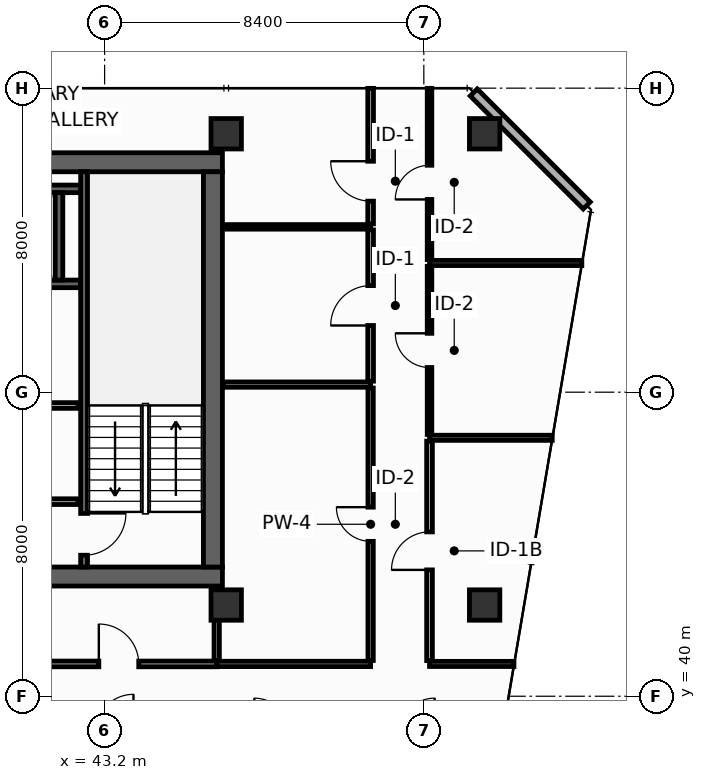
"""IFC4 building model, lengths in metres.
Left out: names, types, materials, properties, quantities, classifications, styles, units other than length and angle.
Written with IfcOpenShell. Run it as: python <this file> out.ifc"""

import sys

from ifc_helpers import new_model, si_unit, direction, frame, frame_2d, origin, origin_2d, place, context, subcontext, project, spatial, rectangle, hollow_rectangle, extrude, element, fill, save


model = new_model("IFC4")
c1 = context("Model", 3, precision=1e-05, world=origin(), true_north=direction((0.0, 1.0)))
c2 = subcontext(c1, "Body", "Model", "MODEL_VIEW")
j1 = project(units=[si_unit("LENGTHUNIT", "METRE"), si_unit("PLANEANGLEUNIT", "RADIAN")], contexts=[c1])
p1 = place(None, origin())
s1 = spatial("IfcSite", under=j1, at=p1, CompositionType="ELEMENT")
p2 = place(p1, origin())
s2 = spatial("IfcBuilding", under=s1, at=p2, CompositionType="ELEMENT")
p3 = place(p2, frame((0.0, 0.0, 205.6)))
s3 = spatial("IfcBuildingStorey", under=s2, at=p3, CompositionType="ELEMENT", Elevation=205.6)
p4 = place(p3, frame((13.6, 43.15, 0.0), z_axis=(0.0, 0.0, 1.0), x_axis=(1.0, 0.0, 0.0)))
e1 = element("IfcWall", 1, at=p4, inside=s3, PredefinedType="SHEAR", context=c2, shape_type="SweptSolid", body=[
    extrude(rectangle(XDim=32.7, YDim=0.5, at=frame_2d((16.35, 0.0))), origin(), (0.0, 0.0, 1.0), 3.55),
])
p5 = place(p4, frame((5.4, 0.0, 0.0)))
e2 = element("IfcOpeningElement", 2, at=p5, cuts=e1, PredefinedType="OPENING", context=c2, shape_type="SweptSolid", body=[
    extrude(rectangle(XDim=1.1, YDim=2.15, at=frame_2d((0.55, 1.075))), frame((0.0, 0.26, 0.0), z_axis=(0.0, -1.0, 0.0), x_axis=(1.0, 0.0, 0.0)), (0.0, 0.0, 1.0), 0.52),
])
p6 = place(p4, frame((25.6, 0.0, 0.0)))
e3 = element("IfcOpeningElement", 3, at=p6, cuts=e1, PredefinedType="OPENING", context=c2, shape_type="SweptSolid", body=[
    extrude(rectangle(XDim=1.1, YDim=2.15, at=frame_2d((0.55, 1.075))), frame((0.0, 0.26, 0.0), z_axis=(0.0, -1.0, 0.0), x_axis=(1.0, 0.0, 0.0)), (0.0, 0.0, 1.0), 0.52),
])
p7 = place(p3, frame((13.6, 54.05, 0.0), z_axis=(0.0, 0.0, 1.0), x_axis=(1.0, 0.0, 0.0)))
e4 = element("IfcWall", 4, at=p7, inside=s3, PredefinedType="SHEAR", context=c2, shape_type="SweptSolid", body=[
    extrude(rectangle(XDim=32.7, YDim=0.5, at=frame_2d((16.35, 0.0))), origin(), (0.0, 0.0, 1.0), 3.55),
])
p8 = place(p3, frame((46.05, 43.4, 0.0), z_axis=(0.0, 0.0, 1.0), x_axis=(0.0, 1.0, 0.0)))
e5 = element("IfcWall", 5, at=p8, inside=s3, PredefinedType="SHEAR", context=c2, shape_type="SweptSolid", body=[
    extrude(rectangle(XDim=10.4, YDim=0.5, at=frame_2d((5.2, 0.0))), origin(), (0.0, 0.0, 1.0), 3.55),
])
for number, where, z_axis, x_axis in (
    (6, (46.4, 54.8, 0.0), (0.0, 0.0, 1.0), (1.0, 0.0, 0.0)),
    (7, (53.2, 54.8, 0.0), (0.0, 0.0, 1.0), (1.0, 0.0, 0.0)),
    (8, (46.4, 42.4, 0.0), (0.0, 0.0, 1.0), (1.0, 0.0, 0.0)),
    (9, (53.2, 42.4, 0.0), (0.0, 0.0, 1.0), (1.0, 0.0, 0.0)),
):
    element("IfcColumn", number, at=place(p3, frame(where, z_axis=z_axis, x_axis=x_axis)), inside=s3, PredefinedType="COLUMN", context=c2, shape_type="SweptSolid", body=[
        extrude(hollow_rectangle(XDim=0.8, YDim=0.8, WallThickness=0.036, at=origin_2d()), origin(), (0.0, 0.0, 1.0), 3.8),
    ])
for number, where, z_axis, x_axis in (
    (10, (39.525, 50.85, 0.0), (0.0, 0.0, 1.0), (1.0, 0.0, 0.0)),
    (11, (39.525, 53.35, 0.0), (0.0, 0.0, 1.0), (1.0, 0.0, 0.0)),
):
    element("IfcWall", number, at=place(p3, frame(where, z_axis=z_axis, x_axis=x_axis)), inside=s3, PredefinedType="SHEAR", context=c2, shape_type="SweptSolid", body=[
        extrude(rectangle(XDim=3.045, YDim=0.2, at=frame_2d((1.522, 0.0))), origin(), (0.0, 0.0, 1.0), 3.55),
    ])
p9 = place(p3, frame((42.0, 50.95, 0.0), z_axis=(0.0, 0.0, 1.0), x_axis=(0.0, 1.0, 0.0)))
e12 = element("IfcWall", 12, at=p9, inside=s3, PredefinedType="SHEAR", context=c2, shape_type="SweptSolid", body=[
    extrude(rectangle(XDim=2.3, YDim=0.2, at=frame_2d((1.15, 0.0))), origin(), (0.0, 0.0, 1.0), 3.55),
])
p10 = place(p3, frame((42.66, 53.8, 0.0), z_axis=(0.0, 0.0, 1.0), x_axis=(0.0, -1.0, 0.0)))
e13 = element("IfcWall", 13, at=p10, inside=s3, PredefinedType="SHEAR", context=c2, shape_type="SweptSolid", body=[
    extrude(rectangle(XDim=10.4, YDim=0.18, at=frame_2d((5.2, 0.0))), origin(), (0.0, 0.0, 1.0), 3.55),
])
p11 = place(p10, frame((8.99, 0.0, 0.0)))
e14 = element("IfcOpeningElement", 14, at=p11, cuts=e13, PredefinedType="OPENING", context=c2, shape_type="SweptSolid", body=[
    extrude(rectangle(XDim=1.1, YDim=2.15, at=frame_2d((0.55, 1.075))), frame((0.0, 0.1, 0.0), z_axis=(0.0, -1.0, 0.0), x_axis=(1.0, 0.0, 0.0)), (0.0, 0.0, 1.0), 0.2),
])
p12 = place(p3, frame((33.95, 45.12, 0.0), z_axis=(0.0, 0.0, 1.0), x_axis=(1.0, 0.0, 0.0)))
e15 = element("IfcWall", 15, at=p12, inside=s3, PredefinedType="PARTITIONING", context=c2, shape_type="SweptSolid", body=[
    extrude(rectangle(XDim=8.55, YDim=0.15, at=frame_2d((4.275, 0.0))), origin(), (0.0, 0.0, 1.0), 3.55),
])
p13 = place(p12, frame((0.95, 0.0, 0.0)))
e16 = element("IfcOpeningElement", 16, at=p13, cuts=e15, PredefinedType="OPENING", context=c2, shape_type="SweptSolid", body=[
    extrude(rectangle(XDim=0.95, YDim=2.15, at=frame_2d((0.475, 1.075))), frame((0.0, 0.085, 0.0), z_axis=(0.0, -1.0, 0.0), x_axis=(1.0, 0.0, 0.0)), (0.0, 0.0, 1.0), 0.17),
])
p14 = place(p12, frame((3.8, 0.0, 0.0)))
e17 = element("IfcOpeningElement", 17, at=p14, cuts=e15, PredefinedType="OPENING", context=c2, shape_type="SweptSolid", body=[
    extrude(rectangle(XDim=0.95, YDim=2.15, at=frame_2d((0.475, 1.075))), frame((0.0, 0.085, 0.0), z_axis=(0.0, -1.0, 0.0), x_axis=(1.0, 0.0, 0.0)), (0.0, 0.0, 1.0), 0.17),
])
p15 = place(p12, frame((6.65, 0.0, 0.0)))
e18 = element("IfcOpeningElement", 18, at=p15, cuts=e15, PredefinedType="OPENING", context=c2, shape_type="SweptSolid", body=[
    extrude(rectangle(XDim=0.95, YDim=2.15, at=frame_2d((0.475, 1.075))), frame((0.0, 0.085, 0.0), z_axis=(0.0, -1.0, 0.0), x_axis=(1.0, 0.0, 0.0)), (0.0, 0.0, 1.0), 0.17),
])
p16 = place(p3, frame((33.95, 47.65, 0.0), z_axis=(0.0, 0.0, 1.0), x_axis=(1.0, 0.0, 0.0)))
e19 = element("IfcWall", 19, at=p16, inside=s3, PredefinedType="PARTITIONING", context=c2, shape_type="SweptSolid", body=[
    extrude(rectangle(XDim=8.55, YDim=0.15, at=frame_2d((4.275, 0.0))), origin(), (0.0, 0.0, 1.0), 3.55),
])
p17 = place(p3, frame((55.887, 52.913, 0.0), z_axis=(0.0, 0.0, 1.0), x_axis=(-0.707106781187, 0.707106781187, 0.0)))
e20 = element("IfcWall", 20, at=p17, inside=s3, PredefinedType="STANDARD", context=c2, shape_type="SweptSolid", body=[
    extrude(rectangle(XDim=4.206, YDim=0.26, at=frame_2d((2.103, 0.0))), origin(), (0.0, 0.0, 1.0), 3.55),
])
p18 = place(p3, frame((46.15, 40.85, 0.0), z_axis=(0.0, 0.0, 1.0), x_axis=(1.0, 0.0, 0.0)))
e21 = element("IfcWall", 21, at=p18, inside=s3, PredefinedType="PARTITIONING", context=c2, shape_type="SweptSolid", body=[
    extrude(rectangle(XDim=4.05, YDim=0.14, at=frame_2d((2.025, 0.0))), origin(), (0.0, 0.0, 1.0), 3.55),
])
p19 = place(p3, frame((46.15, 40.94, 0.0), z_axis=(0.0, 0.0, 1.0), x_axis=(0.0, 1.0, 0.0)))
e22 = element("IfcWall", 22, at=p19, inside=s3, PredefinedType="PARTITIONING", context=c2, shape_type="SweptSolid", body=[
    extrude(rectangle(XDim=1.94, YDim=0.14, at=frame_2d((0.97, 0.0))), origin(), (0.0, 0.0, 1.0), 3.55),
])
p20 = place(p3, frame((46.32, 48.2, 0.0), z_axis=(0.0, 0.0, 1.0), x_axis=(1.0, 0.0, 0.0)))
e23 = element("IfcWall", 23, at=p20, inside=s3, PredefinedType="PARTITIONING", context=c2, shape_type="SweptSolid", body=[
    extrude(rectangle(XDim=3.88, YDim=0.14, at=frame_2d((1.94, 0.0))), origin(), (0.0, 0.0, 1.0), 3.55),
])
p21 = place(p3, frame((50.2, 40.94, 0.0), z_axis=(0.0, 0.0, 1.0), x_axis=(0.0, 1.0, 0.0)))
e24 = element("IfcWall", 24, at=p21, inside=s3, PredefinedType="PARTITIONING", context=c2, shape_type="SweptSolid", body=[
    extrude(rectangle(XDim=7.17, YDim=0.14, at=frame_2d((3.585, 0.0))), origin(), (0.0, 0.0, 1.0), 2.835),
])
p22 = place(p21, frame((3.135, 0.0, 0.0)))
e25 = element("IfcOpeningElement", 25, at=p22, cuts=e24, PredefinedType="OPENING", context=c2, shape_type="SweptSolid", body=[
    extrude(rectangle(XDim=0.9, YDim=2.1, at=frame_2d((0.45, 1.05))), frame((0.0, 0.08, 0.0), z_axis=(0.0, -1.0, 0.0), x_axis=(1.0, 0.0, 0.0)), (0.0, 0.0, 1.0), 0.16),
])
p23 = place(p3, frame((46.32, 52.35, 0.0), z_axis=(0.0, 0.0, 1.0), x_axis=(1.0, 0.0, 0.0)))
e26 = element("IfcWall", 26, at=p23, inside=s3, PredefinedType="PARTITIONING", context=c2, shape_type="SweptSolid", body=[
    extrude(rectangle(XDim=3.88, YDim=0.12, at=frame_2d((1.94, 0.0))), origin(), (0.0, 0.0, 1.0), 3.55),
])
p24 = place(p3, frame((50.2, 48.29, 0.0), z_axis=(0.0, 0.0, 1.0), x_axis=(0.0, 1.0, 0.0)))
e27 = element("IfcWall", 27, at=p24, inside=s3, PredefinedType="PARTITIONING", context=c2, shape_type="SweptSolid", body=[
    extrude(rectangle(XDim=3.98, YDim=0.15, at=frame_2d((1.99, 0.0))), origin(), (0.0, 0.0, 1.0), 3.55),
])
p25 = place(p24, frame((1.465, 0.0, 0.0)))
e28 = element("IfcOpeningElement", 28, at=p25, cuts=e27, PredefinedType="OPENING", context=c2, shape_type="SweptSolid", body=[
    extrude(rectangle(XDim=1.05, YDim=2.15, at=frame_2d((0.525, 1.075))), frame((0.0, 0.085, 0.0), z_axis=(0.0, -1.0, 0.0), x_axis=(1.0, 0.0, 0.0)), (0.0, 0.0, 1.0), 0.17),
])
p26 = place(p3, frame((50.2, 52.43, 0.0), z_axis=(0.0, 0.0, 1.0), x_axis=(0.0, 1.0, 0.0)))
e29 = element("IfcWall", 29, at=p26, inside=s3, PredefinedType="PARTITIONING", context=c2, shape_type="SweptSolid", body=[
    extrude(rectangle(XDim=3.565, YDim=0.15, at=frame_2d((1.783, 0.0))), origin(), (0.0, 0.0, 1.0), 2.935),
])
p27 = place(p26, frame((0.597, 0.0, 0.0)))
e30 = element("IfcOpeningElement", 30, at=p27, cuts=e29, PredefinedType="OPENING", context=c2, shape_type="SweptSolid", body=[
    extrude(rectangle(XDim=1.05, YDim=2.15, at=frame_2d((0.525, 1.075))), frame((0.0, 0.085, 0.0), z_axis=(0.0, -1.0, 0.0), x_axis=(1.0, 0.0, 0.0)), (0.0, 0.0, 1.0), 0.17),
])
p28 = place(p3, frame((51.75, 40.85, 0.0), z_axis=(0.0, 0.0, 1.0), x_axis=(1.0, 0.0, 0.0)))
e31 = element("IfcWall", 31, at=p28, inside=s3, PredefinedType="PARTITIONING", context=c2, shape_type="SweptSolid", body=[
    extrude(rectangle(XDim=2.222, YDim=0.135, at=frame_2d((1.111, 0.0))), origin(), (0.0, 0.0, 1.0), 3.035),
])
p29 = place(p3, frame((51.75, 46.8, 0.0), z_axis=(0.0, 0.0, 1.0), x_axis=(1.0, 0.0, 0.0)))
e32 = element("IfcWall", 32, at=p29, inside=s3, PredefinedType="PARTITIONING", context=c2, shape_type="SweptSolid", body=[
    extrude(rectangle(XDim=3.229, YDim=0.135, at=frame_2d((1.615, 0.0))), origin(), (0.0, 0.0, 1.0), 2.835),
])
p30 = place(p3, frame((51.75, 51.4, 0.0), z_axis=(0.0, 0.0, 1.0), x_axis=(1.0, 0.0, 0.0)))
e33 = element("IfcWall", 33, at=p30, inside=s3, PredefinedType="PARTITIONING", context=c2, shape_type="SweptSolid", body=[
    extrude(rectangle(XDim=4.008, YDim=0.135, at=frame_2d((2.004, 0.0))), origin(), (0.0, 0.0, 1.0), 2.835),
])
p31 = place(p3, frame((51.75, 40.938, 0.0), z_axis=(0.0, 0.0, 1.0), x_axis=(0.0, 1.0, 0.0)))
e34 = element("IfcWall", 34, at=p31, inside=s3, PredefinedType="PARTITIONING", context=c2, shape_type="SweptSolid", body=[
    extrude(rectangle(XDim=5.775, YDim=0.15, at=frame_2d((2.887, 0.0))), origin(), (0.0, 0.0, 1.0), 2.835),
])
p32 = place(p31, frame((2.387, 0.0, 0.0)))
e35 = element("IfcOpeningElement", 35, at=p32, cuts=e34, PredefinedType="OPENING", context=c2, shape_type="SweptSolid", body=[
    extrude(rectangle(XDim=1.0, YDim=2.15, at=frame_2d((0.5, 1.075))), frame((0.0, 0.085, 0.0), z_axis=(0.0, -1.0, 0.0), x_axis=(1.0, 0.0, 0.0)), (0.0, 0.0, 1.0), 0.17),
])
p33 = place(p3, frame((51.75, 46.887, 0.0), z_axis=(0.0, 0.0, 1.0), x_axis=(0.0, 1.0, 0.0)))
e36 = element("IfcWall", 36, at=p33, inside=s3, PredefinedType="PARTITIONING", context=c2, shape_type="SweptSolid", body=[
    extrude(rectangle(XDim=4.425, YDim=0.12, at=frame_2d((2.212, 0.0))), origin(), (0.0, 0.0, 1.0), 3.55),
])
p34 = place(p33, frame((1.762, 0.0, 0.0)))
e37 = element("IfcOpeningElement", 37, at=p34, cuts=e36, PredefinedType="OPENING", context=c2, shape_type="SweptSolid", body=[
    extrude(rectangle(XDim=0.9, YDim=2.1, at=frame_2d((0.45, 1.05))), frame((0.0, 0.07, 0.0), z_axis=(0.0, -1.0, 0.0), x_axis=(1.0, 0.0, 0.0)), (0.0, 0.0, 1.0), 0.14),
])
p35 = place(p3, frame((51.75, 51.488, 0.0), z_axis=(0.0, 0.0, 1.0), x_axis=(0.0, 1.0, 0.0)))
e38 = element("IfcWall", 38, at=p35, inside=s3, PredefinedType="PARTITIONING", context=c2, shape_type="SweptSolid", body=[
    extrude(rectangle(XDim=4.508, YDim=0.12, at=frame_2d((2.254, 0.0))), origin(), (0.0, 0.0, 1.0), 2.935),
])
p36 = place(p35, frame((1.584, 0.0, 0.0)))
e39 = element("IfcOpeningElement", 39, at=p36, cuts=e38, PredefinedType="OPENING", context=c2, shape_type="SweptSolid", body=[
    extrude(rectangle(XDim=0.9, YDim=2.1, at=frame_2d((0.45, 1.05))), frame((0.0, 0.07, 0.0), z_axis=(0.0, -1.0, 0.0), x_axis=(1.0, 0.0, 0.0)), (0.0, 0.0, 1.0), 0.14),
])
p37 = place(p3, frame((40.995, 40.85, 0.0), z_axis=(0.0, 0.0, 1.0), x_axis=(1.0, 0.0, 0.0)))
e40 = element("IfcWall", 40, at=p37, inside=s3, PredefinedType="PARTITIONING", context=c2, shape_type="SweptSolid", body=[
    extrude(rectangle(XDim=5.155, YDim=0.15, at=frame_2d((2.577, 0.0))), origin(), (0.0, 0.0, 1.0), 3.55),
])
p38 = place(p37, frame((2.053, 0.0, 0.0)))
e41 = element("IfcOpeningElement", 41, at=p38, cuts=e40, PredefinedType="OPENING", context=c2, shape_type="SweptSolid", body=[
    extrude(rectangle(XDim=1.05, YDim=2.15, at=frame_2d((0.525, 1.075))), frame((0.0, 0.085, 0.0), z_axis=(0.0, -1.0, 0.0), x_axis=(1.0, 0.0, 0.0)), (0.0, 0.0, 1.0), 0.17),
])
p39 = place(p11, origin())
e42 = element("IfcDoor", 42, at=p39, inside=s3, OperationType="SINGLE_SWING_LEFT", PredefinedType="DOOR", context=c2, shape_type="SweptSolid", body=[
    extrude(rectangle(XDim=1.1, YDim=2.15, at=frame_2d((0.55, 1.075))), frame((0.0, 0.025, 0.0), z_axis=(0.0, -1.0, 0.0), x_axis=(1.0, 0.0, 0.0)), (0.0, 0.0, 1.0), 0.05),
])
fill(e14, e42)
p40 = place(p22, origin())
e43 = element("IfcDoor", 43, at=p40, inside=s3, OperationType="SINGLE_SWING_RIGHT", PredefinedType="DOOR", context=c2, shape_type="SweptSolid", body=[
    extrude(rectangle(XDim=0.9, YDim=2.1, at=frame_2d((0.45, 1.05))), frame((0.0, 0.025, 0.0), z_axis=(0.0, -1.0, 0.0), x_axis=(1.0, 0.0, 0.0)), (0.0, 0.0, 1.0), 0.05),
])
fill(e25, e43)
p41 = place(p25, origin())
e44 = element("IfcDoor", 44, at=p41, inside=s3, OperationType="SINGLE_SWING_LEFT", PredefinedType="DOOR", context=c2, shape_type="SweptSolid", body=[
    extrude(rectangle(XDim=1.05, YDim=2.15, at=frame_2d((0.525, 1.075))), frame((0.0, 0.025, 0.0), z_axis=(0.0, -1.0, 0.0), x_axis=(1.0, 0.0, 0.0)), (0.0, 0.0, 1.0), 0.05),
])
fill(e28, e44)
p42 = place(p27, origin())
e45 = element("IfcDoor", 45, at=p42, inside=s3, OperationType="SINGLE_SWING_RIGHT", PredefinedType="DOOR", context=c2, shape_type="SweptSolid", body=[
    extrude(rectangle(XDim=1.05, YDim=2.15, at=frame_2d((0.525, 1.075))), frame((0.0, 0.025, 0.0), z_axis=(0.0, -1.0, 0.0), x_axis=(1.0, 0.0, 0.0)), (0.0, 0.0, 1.0), 0.05),
])
fill(e30, e45)
p43 = place(p32, origin())
e46 = element("IfcDoor", 46, at=p43, inside=s3, OperationType="SINGLE_SWING_LEFT", PredefinedType="DOOR", context=c2, shape_type="SweptSolid", body=[
    extrude(rectangle(XDim=1.0, YDim=2.15, at=frame_2d((0.5, 1.075))), frame((0.0, 0.025, 0.0), z_axis=(0.0, -1.0, 0.0), x_axis=(1.0, 0.0, 0.0)), (0.0, 0.0, 1.0), 0.05),
])
fill(e35, e46)
p44 = place(p34, origin())
e47 = element("IfcDoor", 47, at=p44, inside=s3, OperationType="SINGLE_SWING_RIGHT", PredefinedType="DOOR", context=c2, shape_type="SweptSolid", body=[
    extrude(rectangle(XDim=0.9, YDim=2.1, at=frame_2d((0.45, 1.05))), frame((0.0, 0.025, 0.0), z_axis=(0.0, -1.0, 0.0), x_axis=(1.0, 0.0, 0.0)), (0.0, 0.0, 1.0), 0.05),
])
fill(e37, e47)
p45 = place(p36, origin())
e48 = element("IfcDoor", 48, at=p45, inside=s3, OperationType="SINGLE_SWING_LEFT", PredefinedType="DOOR", context=c2, shape_type="SweptSolid", body=[
    extrude(rectangle(XDim=0.9, YDim=2.1, at=frame_2d((0.45, 1.05))), frame((0.0, 0.025, 0.0), z_axis=(0.0, -1.0, 0.0), x_axis=(1.0, 0.0, 0.0)), (0.0, 0.0, 1.0), 0.05),
])
fill(e39, e48)
p46 = place(p38, origin())
e49 = element("IfcDoor", 49, at=p46, inside=s3, OperationType="SINGLE_SWING_LEFT", PredefinedType="DOOR", context=c2, shape_type="SweptSolid", body=[
    extrude(rectangle(XDim=1.05, YDim=2.15, at=frame_2d((0.525, 1.075))), frame((0.0, 0.025, 0.0), z_axis=(0.0, -1.0, 0.0), x_axis=(1.0, 0.0, 0.0)), (0.0, 0.0, 1.0), 0.05),
])
fill(e41, e49)
save(model, sys.argv[1])
